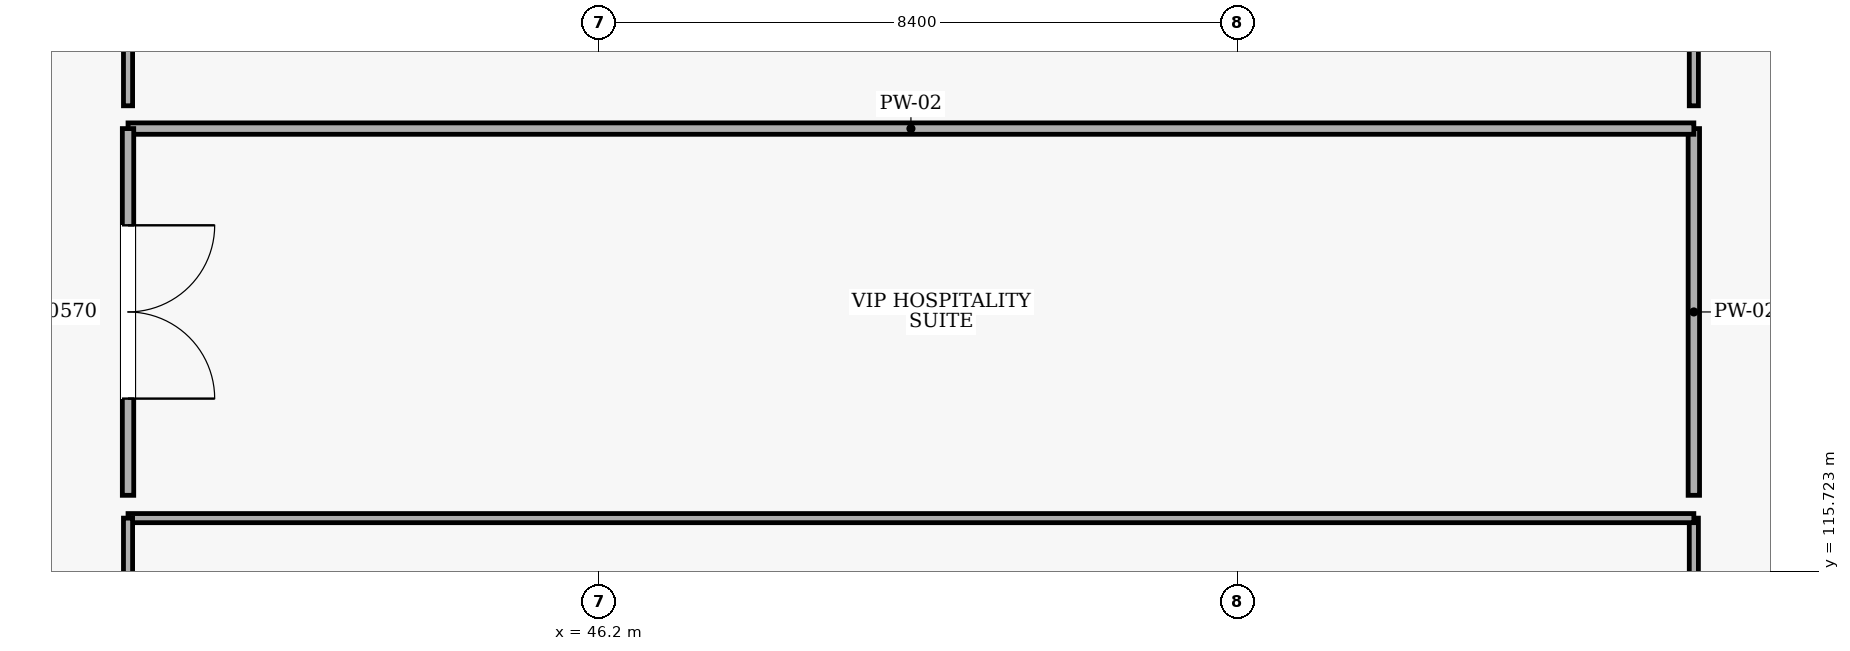
"""IFC4 building model, lengths in metres.
Left out: names, types, materials, properties, quantities, classifications, styles, units other than length and angle.
Written with IfcOpenShell. Run it as: python <this file> out.ifc"""

import sys

from ifc_helpers import new_model, si_unit, direction, frame, frame_2d, origin, place, context, subcontext, project, spatial, rectangle, extrude, element, fill, save


model = new_model("IFC4")
c1 = context("Model", 3, precision=1e-05, world=origin(), true_north=direction((0.0, 1.0)))
c2 = subcontext(c1, "Body", "Model", "MODEL_VIEW")
j1 = project(units=[si_unit("LENGTHUNIT", "METRE"), si_unit("PLANEANGLEUNIT", "RADIAN")], contexts=[c1])
p1 = place(None, origin())
s1 = spatial("IfcSite", under=j1, at=p1, CompositionType="ELEMENT")
p2 = place(p1, origin())
s2 = spatial("IfcBuilding", under=s1, at=p2, CompositionType="ELEMENT")
p3 = place(p2, frame((0.0, 0.0, 10.2)))
s3 = spatial("IfcBuildingStorey", under=s2, at=p3, CompositionType="ELEMENT", Elevation=10.2)
p4 = place(p3, frame((60.6, 112.17, 0.0), z_axis=(0.0, 0.0, 1.0), x_axis=(0.0, 1.0, 0.0)))
e1 = element("IfcWall", 1, at=p4, inside=s3, PredefinedType="PARTITIONING", context=c2, shape_type="SweptSolid", body=[
    extrude(rectangle(XDim=4.255, YDim=0.12, at=frame_2d((2.128, 0.0))), origin(), (0.0, 0.0, 1.0), 4.48),
])
p5 = place(p3, frame((60.6, 116.425, 0.0), z_axis=(0.0, 0.0, 1.0), x_axis=(-1.0, 0.0, 0.0)))
e2 = element("IfcWall", 2, at=p5, inside=s3, PredefinedType="PARTITIONING", context=c2, shape_type="SweptSolid", body=[
    extrude(rectangle(XDim=20.6, YDim=0.12, at=frame_2d((10.3, 0.0))), origin(), (0.0, 0.0, 1.0), 4.48),
])
p6 = place(p3, frame((40.0, 116.425, 0.0), z_axis=(0.0, 0.0, 1.0), x_axis=(0.0, -1.0, 0.0)))
e3 = element("IfcWall", 3, at=p6, inside=s3, PredefinedType="PARTITIONING", context=c2, shape_type="SweptSolid", body=[
    extrude(rectangle(XDim=4.255, YDim=0.12, at=frame_2d((2.128, 0.0))), origin(), (0.0, 0.0, 1.0), 4.48),
])
p7 = place(p6, frame((1.048, 0.0, 0.0)))
e4 = element("IfcOpeningElement", 4, at=p7, cuts=e3, PredefinedType="OPENING", context=c2, shape_type="SweptSolid", body=[
    extrude(rectangle(XDim=2.16, YDim=2.35, at=frame_2d((1.08, 1.175))), frame((0.0, 0.07, 0.0), z_axis=(0.0, -1.0, 0.0), x_axis=(1.0, 0.0, 0.0)), (0.0, 0.0, 1.0), 0.14),
])
p8 = place(p3, frame((60.6, 116.725, 0.0), z_axis=(0.0, 0.0, 1.0), x_axis=(0.0, 1.0, 0.0)))
e5 = element("IfcWall", 5, at=p8, inside=s3, PredefinedType="PARTITIONING", context=c2, shape_type="SweptSolid", body=[
    extrude(rectangle(XDim=4.825, YDim=0.15, at=frame_2d((2.412, 0.0))), origin(), (0.0, 0.0, 1.0), 4.48),
])
p9 = place(p3, frame((60.6, 121.55, 0.0), z_axis=(0.0, 0.0, 1.0), x_axis=(-1.0, 0.0, 0.0)))
e6 = element("IfcWall", 6, at=p9, inside=s3, PredefinedType="PARTITIONING", context=c2, shape_type="SweptSolid", body=[
    extrude(rectangle(XDim=20.6, YDim=0.15, at=frame_2d((10.3, 0.0))), origin(), (0.0, 0.0, 1.0), 4.48),
])
p10 = place(p3, frame((40.0, 121.55, 0.0), z_axis=(0.0, 0.0, 1.0), x_axis=(0.0, -1.0, 0.0)))
e7 = element("IfcWall", 7, at=p10, inside=s3, PredefinedType="PARTITIONING", context=c2, shape_type="SweptSolid", body=[
    extrude(rectangle(XDim=4.825, YDim=0.15, at=frame_2d((2.412, 0.0))), origin(), (0.0, 0.0, 1.0), 4.48),
])
p11 = place(p10, frame((1.272, 0.0, 0.0)))
e8 = element("IfcOpeningElement", 8, at=p11, cuts=e7, PredefinedType="OPENING", context=c2, shape_type="SweptSolid", body=[
    extrude(rectangle(XDim=2.28, YDim=2.4, at=frame_2d((1.14, 1.2))), frame((0.0, 0.085, 0.0), z_axis=(0.0, -1.0, 0.0), x_axis=(1.0, 0.0, 0.0)), (0.0, 0.0, 1.0), 0.17),
])
p12 = place(p3, frame((60.6, 121.85, 0.0), z_axis=(0.0, 0.0, 1.0), x_axis=(0.0, 1.0, 0.0)))
e9 = element("IfcWall", 9, at=p12, inside=s3, PredefinedType="PARTITIONING", context=c2, shape_type="SweptSolid", body=[
    extrude(rectangle(XDim=4.255, YDim=0.12, at=frame_2d((2.127, 0.0))), origin(), (0.0, 0.0, 1.0), 4.48),
])
p13 = place(p3, frame((40.0, 126.105, 0.0), z_axis=(0.0, 0.0, 1.0), x_axis=(0.0, -1.0, 0.0)))
e10 = element("IfcWall", 10, at=p13, inside=s3, PredefinedType="PARTITIONING", context=c2, shape_type="SweptSolid", body=[
    extrude(rectangle(XDim=4.255, YDim=0.12, at=frame_2d((2.127, 0.0))), origin(), (0.0, 0.0, 1.0), 4.48),
])
p14 = place(p13, frame((0.948, 0.0, 0.0)))
e11 = element("IfcOpeningElement", 11, at=p14, cuts=e10, PredefinedType="OPENING", context=c2, shape_type="SweptSolid", body=[
    extrude(rectangle(XDim=2.36, YDim=2.4, at=frame_2d((1.18, 1.2))), frame((0.0, 0.07, 0.0), z_axis=(0.0, -1.0, 0.0), x_axis=(1.0, 0.0, 0.0)), (0.0, 0.0, 1.0), 0.14),
])
p15 = place(p11, origin())
e12 = element("IfcDoor", 12, at=p15, inside=s3, OperationType="DOUBLE_DOOR_SINGLE_SWING", PredefinedType="DOOR", context=c2, shape_type="SweptSolid", body=[
    extrude(rectangle(XDim=2.28, YDim=2.4, at=frame_2d((1.14, 1.2))), frame((0.0, 0.025, 0.0), z_axis=(0.0, -1.0, 0.0), x_axis=(1.0, 0.0, 0.0)), (0.0, 0.0, 1.0), 0.05),
])
fill(e8, e12)
save(model, sys.argv[1])
